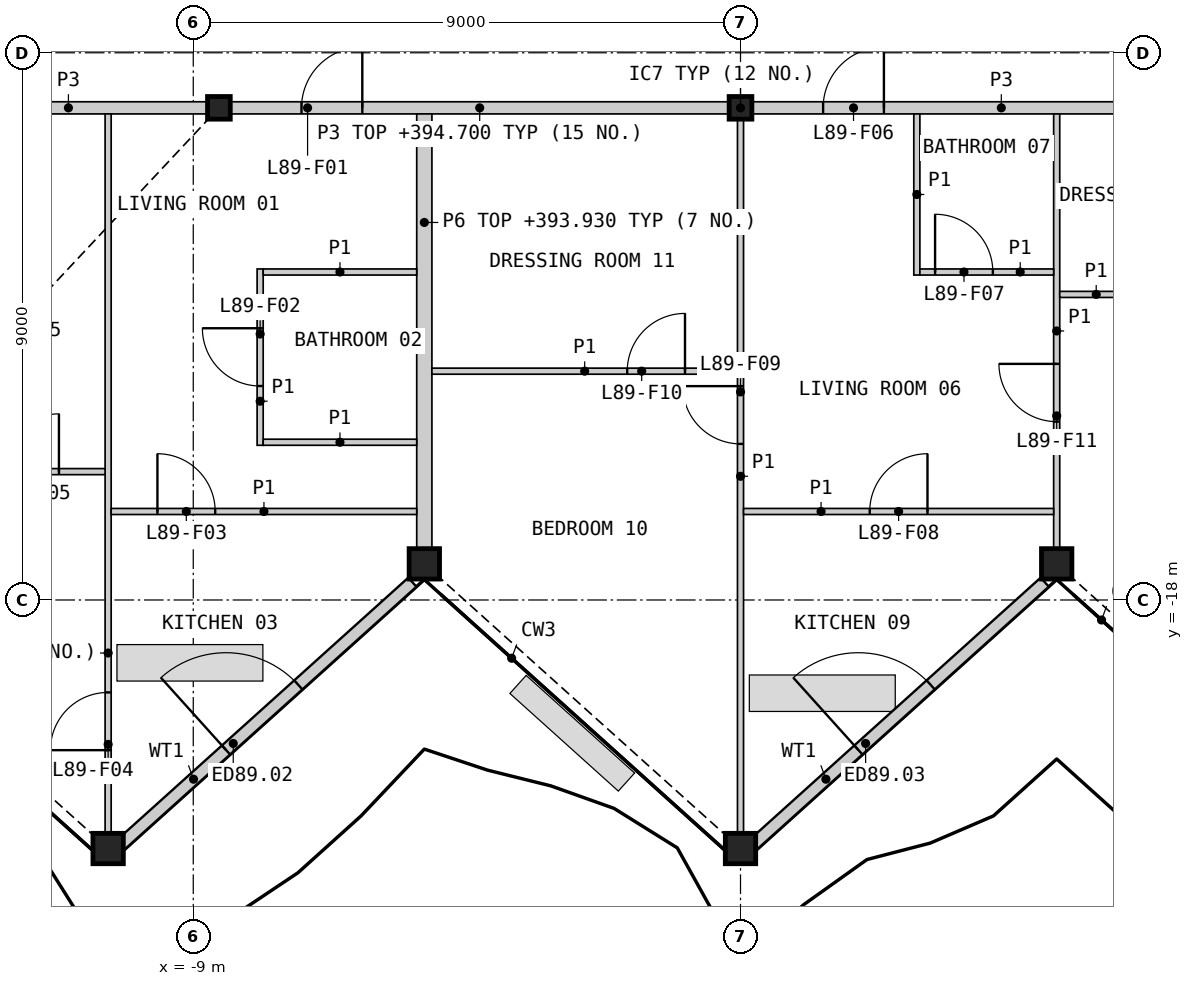
"""IFC4 building model, lengths in metres.
Left out: names, types, materials, properties, quantities, classifications, styles, units other than length and angle.
Written with IfcOpenShell. Run it as: python <this file> out.ifc"""

import sys

from ifc_helpers import new_model, si_unit, direction, frame, frame_2d, origin, origin_2d, place, context, subcontext, project, spatial, rectangle, hollow_rectangle, i_section, extrude, element, fill, save


model = new_model("IFC4")
c1 = context("Model", 3, precision=1e-05, world=origin(), true_north=direction((0.0, 1.0)))
c2 = subcontext(c1, "Body", "Model", "MODEL_VIEW")
j1 = project(units=[si_unit("LENGTHUNIT", "METRE"), si_unit("PLANEANGLEUNIT", "RADIAN")], contexts=[c1])
p1 = place(None, origin())
s1 = spatial("IfcSite", under=j1, at=p1, CompositionType="ELEMENT")
p2 = place(p1, origin())
s2 = spatial("IfcBuilding", under=s1, at=p2, CompositionType="ELEMENT")
p3 = place(p2, frame((0.0, 0.0, 391.6)))
s3 = spatial("IfcBuildingStorey", under=s2, at=p3, CompositionType="ELEMENT", Elevation=391.6)
for number, where, z_axis, x_axis in (
    (1, (-10.4, -22.088, 0.0), (0.0, 0.0, 1.0), (1.0, 0.0, 0.0)),
    (2, (-5.2, -17.406, 0.0), (0.0, 0.0, 1.0), (1.0, 0.0, 0.0)),
    (3, (0.0, -22.088, 0.0), (0.0, 0.0, 1.0), (1.0, 0.0, 0.0)),
    (4, (5.2, -17.406, 0.0), (0.0, 0.0, 1.0), (1.0, 0.0, 0.0)),
):
    element("IfcColumn", number, at=place(p3, frame(where, z_axis=z_axis, x_axis=x_axis)), inside=s3, PredefinedType="COLUMN", context=c2, shape_type="SweptSolid", body=[
        extrude(hollow_rectangle(XDim=0.5, YDim=0.5, WallThickness=0.03, at=origin_2d()), origin(), (0.0, 0.0, 1.0), 3.4),
    ])
for number, where, z_axis, x_axis in (
    (5, (-8.578, -9.906, 0.0), (0.0, 0.0, 1.0), (1.0, 0.0, 0.0)),
    (6, (0.0, -9.906, 0.0), (0.0, 0.0, 1.0), (1.0, 0.0, 0.0)),
):
    element("IfcColumn", number, at=place(p3, frame(where, z_axis=z_axis, x_axis=x_axis)), inside=s3, PredefinedType="COLUMN", context=c2, shape_type="SweptSolid", body=[
        extrude(i_section(OverallWidth=0.374, OverallDepth=0.372, WebThickness=0.016, FlangeThickness=0.026, at=origin_2d()), origin(), (0.0, 0.0, 1.0), 3.4),
    ])
p4 = place(p3, frame((-10.195, -22.028, 0.0), z_axis=(0.0, 0.0, 1.0), x_axis=(0.743136196971, 0.669140189162, 0.0)))
e7 = element("IfcWall", 7, at=p4, inside=s3, PredefinedType="SOLIDWALL", context=c2, shape_type="SweptSolid", body=[
    extrude(rectangle(XDim=6.457, YDim=0.2, at=frame_2d((3.229, 0.0))), origin(), (0.0, 0.0, 1.0), 2.634),
])
p5 = place(p4, frame((2.333, 0.0, 0.0)))
e8 = element("IfcOpeningElement", 8, at=p5, cuts=e7, PredefinedType="OPENING", context=c2, shape_type="SweptSolid", body=[
    extrude(rectangle(XDim=1.6, YDim=2.25, at=frame_2d((0.8, 1.125))), frame((0.0, 0.11, 0.0), z_axis=(0.0, -1.0, 0.0), x_axis=(1.0, 0.0, 0.0)), (0.0, 0.0, 1.0), 0.22),
])
p6 = place(p3, frame((0.205, -22.028, 0.0), z_axis=(0.0, 0.0, 1.0), x_axis=(0.743136196971, 0.669140189162, 0.0)))
e9 = element("IfcWall", 9, at=p6, inside=s3, PredefinedType="SOLIDWALL", context=c2, shape_type="SweptSolid", body=[
    extrude(rectangle(XDim=6.457, YDim=0.2, at=frame_2d((3.229, 0.0))), origin(), (0.0, 0.0, 1.0), 2.634),
])
p7 = place(p6, frame((2.333, 0.0, 0.0)))
e10 = element("IfcOpeningElement", 10, at=p7, cuts=e9, PredefinedType="OPENING", context=c2, shape_type="SweptSolid", body=[
    extrude(rectangle(XDim=1.6, YDim=2.25, at=frame_2d((0.8, 1.125))), frame((0.0, 0.11, 0.0), z_axis=(0.0, -1.0, 0.0), x_axis=(1.0, 0.0, 0.0)), (0.0, 0.0, 1.0), 0.22),
])
p8 = place(p3, frame((-8.382, -9.906, 0.0), z_axis=(0.0, 0.0, 1.0), x_axis=(1.0, 0.0, 0.0)))
e11 = element("IfcWall", 11, at=p8, inside=s3, PredefinedType="PARTITIONING", context=c2, shape_type="SweptSolid", body=[
    extrude(rectangle(XDim=8.185, YDim=0.2, at=frame_2d((4.092, 0.0))), origin(), (0.0, 0.0, 1.0), 3.1),
])
p9 = place(p8, frame((1.162, 0.0, 0.0)))
e12 = element("IfcOpeningElement", 12, at=p9, cuts=e11, PredefinedType="OPENING", context=c2, shape_type="SweptSolid", body=[
    extrude(rectangle(XDim=1.0, YDim=2.1, at=frame_2d((0.5, 1.05))), frame((0.0, 0.11, 0.0), z_axis=(0.0, -1.0, 0.0), x_axis=(1.0, 0.0, 0.0)), (0.0, 0.0, 1.0), 0.22),
])
p10 = place(p3, frame((0.197, -9.906, 0.0), z_axis=(0.0, 0.0, 1.0), x_axis=(1.0, 0.0, 0.0)))
e13 = element("IfcWall", 13, at=p10, inside=s3, PredefinedType="PARTITIONING", context=c2, shape_type="SweptSolid", body=[
    extrude(rectangle(XDim=8.185, YDim=0.2, at=frame_2d((4.092, 0.0))), origin(), (0.0, 0.0, 1.0), 3.1),
])
p11 = place(p10, frame((1.162, 0.0, 0.0)))
e14 = element("IfcOpeningElement", 14, at=p11, cuts=e13, PredefinedType="OPENING", context=c2, shape_type="SweptSolid", body=[
    extrude(rectangle(XDim=1.0, YDim=2.1, at=frame_2d((0.5, 1.05))), frame((0.0, 0.11, 0.0), z_axis=(0.0, -1.0, 0.0), x_axis=(1.0, 0.0, 0.0)), (0.0, 0.0, 1.0), 0.22),
])
p12 = place(p3, frame((-5.2, -17.146, 0.0), z_axis=(0.0, 0.0, 1.0), x_axis=(0.0, 1.0, 0.0)))
e15 = element("IfcWall", 15, at=p12, inside=s3, PredefinedType="PARTITIONING", context=c2, shape_type="SweptSolid", body=[
    extrude(rectangle(XDim=7.14, YDim=0.25, at=frame_2d((3.57, 0.0))), origin(), (0.0, 0.0, 1.0), 2.33),
])
p13 = place(p3, frame((-13.331, -9.906, 0.0), z_axis=(0.0, 0.0, 1.0), x_axis=(1.0, 0.0, 0.0)))
e16 = element("IfcWall", 16, at=p13, inside=s3, PredefinedType="PARTITIONING", context=c2, shape_type="SweptSolid", body=[
    extrude(rectangle(XDim=4.555, YDim=0.2, at=frame_2d((2.278, 0.0))), origin(), (0.0, 0.0, 1.0), 3.1),
])
p14 = place(p3, frame((-10.4, -21.828, 0.0), z_axis=(0.0, 0.0, 1.0), x_axis=(0.0, 1.0, 0.0)))
e17 = element("IfcWall", 17, at=p14, inside=s3, PredefinedType="PARTITIONING", context=c2, shape_type="SweptSolid", body=[
    extrude(rectangle(XDim=11.822, YDim=0.1, at=frame_2d((5.911, 0.0))), origin(), (0.0, 0.0, 1.0), 2.33),
])
p15 = place(p14, frame((1.358, 0.0, 0.0)))
e18 = element("IfcOpeningElement", 18, at=p15, cuts=e17, PredefinedType="OPENING", context=c2, shape_type="SweptSolid", body=[
    extrude(rectangle(XDim=0.95, YDim=2.1, at=frame_2d((0.475, 1.05))), frame((0.0, 0.06, 0.0), z_axis=(0.0, -1.0, 0.0), x_axis=(1.0, 0.0, 0.0)), (0.0, 0.0, 1.0), 0.12),
])
p16 = place(p3, frame((0.0, -21.828, 0.0), z_axis=(0.0, 0.0, 1.0), x_axis=(0.0, 1.0, 0.0)))
e19 = element("IfcWall", 19, at=p16, inside=s3, PredefinedType="PARTITIONING", context=c2, shape_type="SweptSolid", body=[
    extrude(rectangle(XDim=11.725, YDim=0.1, at=frame_2d((5.863, 0.0))), origin(), (0.0, 0.0, 1.0), 2.33),
])
p17 = place(p16, frame((6.395, 0.0, 0.0)))
e20 = element("IfcOpeningElement", 20, at=p17, cuts=e19, PredefinedType="OPENING", context=c2, shape_type="SweptSolid", body=[
    extrude(rectangle(XDim=0.95, YDim=2.1, at=frame_2d((0.475, 1.05))), frame((0.0, 0.06, 0.0), z_axis=(0.0, -1.0, 0.0), x_axis=(1.0, 0.0, 0.0)), (0.0, 0.0, 1.0), 0.12),
])
p18 = place(p3, frame((5.2, -17.146, 0.0), z_axis=(0.0, 0.0, 1.0), x_axis=(0.0, 1.0, 0.0)))
e21 = element("IfcWall", 21, at=p18, inside=s3, PredefinedType="PARTITIONING", context=c2, shape_type="SweptSolid", body=[
    extrude(rectangle(XDim=7.14, YDim=0.1, at=frame_2d((3.57, 0.0))), origin(), (0.0, 0.0, 1.0), 2.33),
])
p19 = place(p18, frame((2.079, 0.0, 0.0)))
e22 = element("IfcOpeningElement", 22, at=p19, cuts=e21, PredefinedType="OPENING", context=c2, shape_type="SweptSolid", body=[
    extrude(rectangle(XDim=0.95, YDim=2.1, at=frame_2d((0.475, 1.05))), frame((0.0, 0.06, 0.0), z_axis=(0.0, -1.0, 0.0), x_axis=(1.0, 0.0, 0.0)), (0.0, 0.0, 1.0), 0.12),
])
p20 = place(p3, frame((-16.685, -15.889, 0.0), z_axis=(0.0, 0.0, 1.0), x_axis=(1.0, 0.0, 0.0)))
e23 = element("IfcWall", 23, at=p20, inside=s3, PredefinedType="PARTITIONING", context=c2, shape_type="SweptSolid", body=[
    extrude(rectangle(XDim=6.235, YDim=0.1, at=frame_2d((3.118, 0.0))), origin(), (0.0, 0.0, 1.0), 2.33),
])
p21 = place(p20, frame((4.526, 0.0, 0.0)))
e24 = element("IfcOpeningElement", 24, at=p21, cuts=e23, PredefinedType="OPENING", context=c2, shape_type="SweptSolid", body=[
    extrude(rectangle(XDim=0.95, YDim=2.1, at=frame_2d((0.475, 1.05))), frame((0.0, 0.06, 0.0), z_axis=(0.0, -1.0, 0.0), x_axis=(1.0, 0.0, 0.0)), (0.0, 0.0, 1.0), 0.12),
])
p22 = place(p3, frame((-10.35, -16.544, 0.0), z_axis=(0.0, 0.0, 1.0), x_axis=(1.0, 0.0, 0.0)))
e25 = element("IfcWall", 25, at=p22, inside=s3, PredefinedType="PARTITIONING", context=c2, shape_type="SweptSolid", body=[
    extrude(rectangle(XDim=5.025, YDim=0.1, at=frame_2d((2.513, 0.0))), origin(), (0.0, 0.0, 1.0), 2.33),
])
p23 = place(p22, frame((0.761, 0.0, 0.0)))
e26 = element("IfcOpeningElement", 26, at=p23, cuts=e25, PredefinedType="OPENING", context=c2, shape_type="SweptSolid", body=[
    extrude(rectangle(XDim=0.95, YDim=2.1, at=frame_2d((0.475, 1.05))), frame((0.0, 0.06, 0.0), z_axis=(0.0, -1.0, 0.0), x_axis=(1.0, 0.0, 0.0)), (0.0, 0.0, 1.0), 0.12),
])
p24 = place(p3, frame((0.05, -16.544, 0.0), z_axis=(0.0, 0.0, 1.0), x_axis=(1.0, 0.0, 0.0)))
e27 = element("IfcWall", 27, at=p24, inside=s3, PredefinedType="PARTITIONING", context=c2, shape_type="SweptSolid", body=[
    extrude(rectangle(XDim=5.1, YDim=0.1, at=frame_2d((2.55, 0.0))), origin(), (0.0, 0.0, 1.0), 2.33),
])
p25 = place(p24, frame((2.075, 0.0, 0.0)))
e28 = element("IfcOpeningElement", 28, at=p25, cuts=e27, PredefinedType="OPENING", context=c2, shape_type="SweptSolid", body=[
    extrude(rectangle(XDim=0.95, YDim=2.1, at=frame_2d((0.475, 1.05))), frame((0.0, 0.06, 0.0), z_axis=(0.0, -1.0, 0.0), x_axis=(1.0, 0.0, 0.0)), (0.0, 0.0, 1.0), 0.12),
])
p26 = place(p3, frame((-5.075, -14.237, 0.0), z_axis=(0.0, 0.0, 1.0), x_axis=(1.0, 0.0, 0.0)))
e29 = element("IfcWall", 29, at=p26, inside=s3, PredefinedType="PARTITIONING", context=c2, shape_type="SweptSolid", body=[
    extrude(rectangle(XDim=5.025, YDim=0.1, at=frame_2d((2.512, 0.0))), origin(), (0.0, 0.0, 1.0), 2.33),
])
p27 = place(p26, frame((3.212, 0.0, 0.0)))
e30 = element("IfcOpeningElement", 30, at=p27, cuts=e29, PredefinedType="OPENING", context=c2, shape_type="SweptSolid", body=[
    extrude(rectangle(XDim=0.95, YDim=2.1, at=frame_2d((0.475, 1.05))), frame((0.0, 0.06, 0.0), z_axis=(0.0, -1.0, 0.0), x_axis=(1.0, 0.0, 0.0)), (0.0, 0.0, 1.0), 0.12),
])
p28 = place(p3, frame((-7.9, -15.456, 0.0), z_axis=(0.0, 0.0, 1.0), x_axis=(0.0, 1.0, 0.0)))
e31 = element("IfcWall", 31, at=p28, inside=s3, PredefinedType="PARTITIONING", context=c2, shape_type="SweptSolid", body=[
    extrude(rectangle(XDim=2.9, YDim=0.1, at=frame_2d((1.45, 0.0))), origin(), (0.0, 0.0, 1.0), 2.33),
])
p29 = place(p28, frame((0.975, 0.0, 0.0)))
e32 = element("IfcOpeningElement", 32, at=p29, cuts=e31, PredefinedType="OPENING", context=c2, shape_type="SweptSolid", body=[
    extrude(rectangle(XDim=0.95, YDim=2.1, at=frame_2d((0.475, 1.05))), frame((0.0, 0.06, 0.0), z_axis=(0.0, -1.0, 0.0), x_axis=(1.0, 0.0, 0.0)), (0.0, 0.0, 1.0), 0.12),
])
p30 = place(p3, frame((2.9, -12.656, 0.0), z_axis=(0.0, 0.0, 1.0), x_axis=(0.0, 1.0, 0.0)))
e33 = element("IfcWall", 33, at=p30, inside=s3, PredefinedType="PARTITIONING", context=c2, shape_type="SweptSolid", body=[
    extrude(rectangle(XDim=2.65, YDim=0.1, at=frame_2d((1.325, 0.0))), origin(), (0.0, 0.0, 1.0), 2.33),
])
for number, where, z_axis, x_axis in (
    (34, (-7.85, -12.606, 0.0), (0.0, 0.0, 1.0), (1.0, 0.0, 0.0)),
    (35, (-7.85, -15.406, 0.0), (0.0, 0.0, 1.0), (1.0, 0.0, 0.0)),
):
    element("IfcWall", number, at=place(p3, frame(where, z_axis=z_axis, x_axis=x_axis)), inside=s3, PredefinedType="PARTITIONING", context=c2, shape_type="SweptSolid", body=[
        extrude(rectangle(XDim=2.525, YDim=0.1, at=frame_2d((1.263, 0.0))), origin(), (0.0, 0.0, 1.0), 2.33),
    ])
p31 = place(p3, frame((5.25, -12.974, 0.0), z_axis=(0.0, 0.0, 1.0), x_axis=(1.0, 0.0, 0.0)))
e36 = element("IfcWall", 36, at=p31, inside=s3, PredefinedType="PARTITIONING", context=c2, shape_type="SweptSolid", body=[
    extrude(rectangle(XDim=2.4, YDim=0.1, at=frame_2d((1.2, 0.0))), origin(), (0.0, 0.0, 1.0), 2.33),
])
p32 = place(p31, frame((1.2, 0.0, 0.0)))
e37 = element("IfcOpeningElement", 37, at=p32, cuts=e36, PredefinedType="OPENING", context=c2, shape_type="SweptSolid", body=[
    extrude(rectangle(XDim=0.95, YDim=2.1, at=frame_2d((0.475, 1.05))), frame((0.0, 0.06, 0.0), z_axis=(0.0, -1.0, 0.0), x_axis=(1.0, 0.0, 0.0)), (0.0, 0.0, 1.0), 0.12),
])
p33 = place(p3, frame((2.95, -12.606, 0.0), z_axis=(0.0, 0.0, 1.0), x_axis=(1.0, 0.0, 0.0)))
e38 = element("IfcWall", 38, at=p33, inside=s3, PredefinedType="PARTITIONING", context=c2, shape_type="SweptSolid", body=[
    extrude(rectangle(XDim=2.2, YDim=0.1, at=frame_2d((1.1, 0.0))), origin(), (0.0, 0.0, 1.0), 2.33),
])
p34 = place(p33, frame((0.25, 0.0, 0.0)))
e39 = element("IfcOpeningElement", 39, at=p34, cuts=e38, PredefinedType="OPENING", context=c2, shape_type="SweptSolid", body=[
    extrude(rectangle(XDim=0.95, YDim=2.1, at=frame_2d((0.475, 1.05))), frame((0.0, 0.06, 0.0), z_axis=(0.0, -1.0, 0.0), x_axis=(1.0, 0.0, 0.0)), (0.0, 0.0, 1.0), 0.12),
])
p35 = place(p5, origin())
e40 = element("IfcDoor", 40, at=p35, inside=s3, OperationType="DOUBLE_DOOR_SINGLE_SWING", PredefinedType="DOOR", context=c2, shape_type="SweptSolid", body=[
    extrude(rectangle(XDim=1.6, YDim=2.25, at=frame_2d((0.8, 1.125))), frame((0.0, 0.025, 0.0), z_axis=(0.0, -1.0, 0.0), x_axis=(1.0, 0.0, 0.0)), (0.0, 0.0, 1.0), 0.05),
])
fill(e8, e40)
p36 = place(p7, origin())
e41 = element("IfcDoor", 41, at=p36, inside=s3, OperationType="DOUBLE_DOOR_SINGLE_SWING", PredefinedType="DOOR", context=c2, shape_type="SweptSolid", body=[
    extrude(rectangle(XDim=1.6, YDim=2.25, at=frame_2d((0.8, 1.125))), frame((0.0, 0.025, 0.0), z_axis=(0.0, -1.0, 0.0), x_axis=(1.0, 0.0, 0.0)), (0.0, 0.0, 1.0), 0.05),
])
fill(e10, e41)
p37 = place(p9, origin())
e42 = element("IfcDoor", 42, at=p37, inside=s3, OperationType="SINGLE_SWING_RIGHT", PredefinedType="DOOR", context=c2, shape_type="SweptSolid", body=[
    extrude(rectangle(XDim=1.0, YDim=2.1, at=frame_2d((0.5, 1.05))), frame((0.0, 0.025, 0.0), z_axis=(0.0, -1.0, 0.0), x_axis=(1.0, 0.0, 0.0)), (0.0, 0.0, 1.0), 0.05),
])
fill(e12, e42)
p38 = place(p29, origin())
e43 = element("IfcDoor", 43, at=p38, inside=s3, OperationType="SINGLE_SWING_RIGHT", PredefinedType="DOOR", context=c2, shape_type="SweptSolid", body=[
    extrude(rectangle(XDim=0.95, YDim=2.1, at=frame_2d((0.475, 1.05))), frame((0.0, 0.025, 0.0), z_axis=(0.0, -1.0, 0.0), x_axis=(1.0, 0.0, 0.0)), (0.0, 0.0, 1.0), 0.05),
])
fill(e32, e43)
p39 = place(p23, origin())
e44 = element("IfcDoor", 44, at=p39, inside=s3, OperationType="SINGLE_SWING_LEFT", PredefinedType="DOOR", context=c2, shape_type="SweptSolid", body=[
    extrude(rectangle(XDim=0.95, YDim=2.1, at=frame_2d((0.475, 1.05))), frame((0.0, 0.025, 0.0), z_axis=(0.0, -1.0, 0.0), x_axis=(1.0, 0.0, 0.0)), (0.0, 0.0, 1.0), 0.05),
])
fill(e26, e44)
p40 = place(p15, origin())
e45 = element("IfcDoor", 45, at=p40, inside=s3, OperationType="SINGLE_SWING_LEFT", PredefinedType="DOOR", context=c2, shape_type="SweptSolid", body=[
    extrude(rectangle(XDim=0.95, YDim=2.1, at=frame_2d((0.475, 1.05))), frame((0.0, 0.025, 0.0), z_axis=(0.0, -1.0, 0.0), x_axis=(1.0, 0.0, 0.0)), (0.0, 0.0, 1.0), 0.05),
])
fill(e18, e45)
p41 = place(p21, origin())
e46 = element("IfcDoor", 46, at=p41, inside=s3, OperationType="SINGLE_SWING_RIGHT", PredefinedType="DOOR", context=c2, shape_type="SweptSolid", body=[
    extrude(rectangle(XDim=0.95, YDim=2.1, at=frame_2d((0.475, 1.05))), frame((0.0, 0.025, 0.0), z_axis=(0.0, -1.0, 0.0), x_axis=(1.0, 0.0, 0.0)), (0.0, 0.0, 1.0), 0.05),
])
fill(e24, e46)
p42 = place(p11, origin())
e47 = element("IfcDoor", 47, at=p42, inside=s3, OperationType="SINGLE_SWING_RIGHT", PredefinedType="DOOR", context=c2, shape_type="SweptSolid", body=[
    extrude(rectangle(XDim=1.0, YDim=2.1, at=frame_2d((0.5, 1.05))), frame((0.0, 0.025, 0.0), z_axis=(0.0, -1.0, 0.0), x_axis=(1.0, 0.0, 0.0)), (0.0, 0.0, 1.0), 0.05),
])
fill(e14, e47)
p43 = place(p34, origin())
e48 = element("IfcDoor", 48, at=p43, inside=s3, OperationType="SINGLE_SWING_LEFT", PredefinedType="DOOR", context=c2, shape_type="SweptSolid", body=[
    extrude(rectangle(XDim=0.95, YDim=2.1, at=frame_2d((0.475, 1.05))), frame((0.0, 0.025, 0.0), z_axis=(0.0, -1.0, 0.0), x_axis=(1.0, 0.0, 0.0)), (0.0, 0.0, 1.0), 0.05),
])
fill(e39, e48)
p44 = place(p25, origin())
e49 = element("IfcDoor", 49, at=p44, inside=s3, OperationType="SINGLE_SWING_RIGHT", PredefinedType="DOOR", context=c2, shape_type="SweptSolid", body=[
    extrude(rectangle(XDim=0.95, YDim=2.1, at=frame_2d((0.475, 1.05))), frame((0.0, 0.025, 0.0), z_axis=(0.0, -1.0, 0.0), x_axis=(1.0, 0.0, 0.0)), (0.0, 0.0, 1.0), 0.05),
])
fill(e28, e49)
p45 = place(p17, origin())
e50 = element("IfcDoor", 50, at=p45, inside=s3, OperationType="SINGLE_SWING_RIGHT", PredefinedType="DOOR", context=c2, shape_type="SweptSolid", body=[
    extrude(rectangle(XDim=0.95, YDim=2.1, at=frame_2d((0.475, 1.05))), frame((0.0, 0.025, 0.0), z_axis=(0.0, -1.0, 0.0), x_axis=(1.0, 0.0, 0.0)), (0.0, 0.0, 1.0), 0.05),
])
fill(e20, e50)
p46 = place(p27, origin())
e51 = element("IfcDoor", 51, at=p46, inside=s3, OperationType="SINGLE_SWING_RIGHT", PredefinedType="DOOR", context=c2, shape_type="SweptSolid", body=[
    extrude(rectangle(XDim=0.95, YDim=2.1, at=frame_2d((0.475, 1.05))), frame((0.0, 0.025, 0.0), z_axis=(0.0, -1.0, 0.0), x_axis=(1.0, 0.0, 0.0)), (0.0, 0.0, 1.0), 0.05),
])
fill(e30, e51)
p47 = place(p19, origin())
e52 = element("IfcDoor", 52, at=p47, inside=s3, OperationType="SINGLE_SWING_RIGHT", PredefinedType="DOOR", context=c2, shape_type="SweptSolid", body=[
    extrude(rectangle(XDim=0.95, YDim=2.1, at=frame_2d((0.475, 1.05))), frame((0.0, 0.025, 0.0), z_axis=(0.0, -1.0, 0.0), x_axis=(1.0, 0.0, 0.0)), (0.0, 0.0, 1.0), 0.05),
])
fill(e22, e52)
save(model, sys.argv[1])
